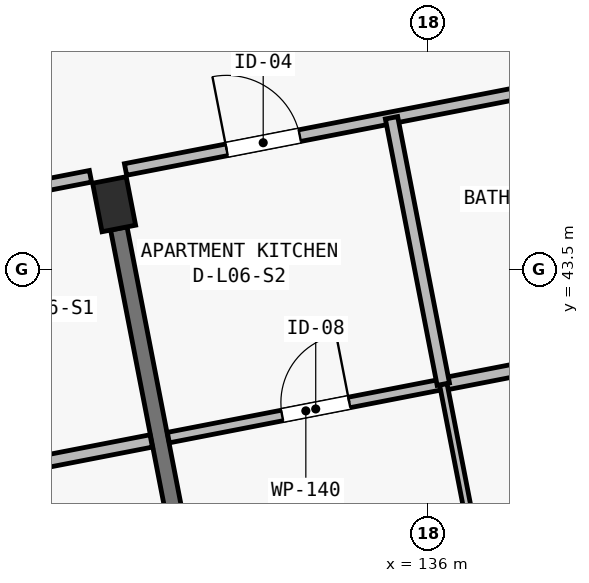
"""IFC4 building model, lengths in metres.
Left out: names, types, materials, properties, quantities, classifications, styles, units other than length and angle.
Written with IfcOpenShell. Run it as: python <this file> out.ifc"""

import sys

from ifc_helpers import new_model, si_unit, direction, frame, frame_2d, origin, origin_2d, place, context, subcontext, project, spatial, rectangle, extrude, element, fill, save


model = new_model("IFC4")
c1 = context("Model", 3, precision=1e-05, world=origin(), true_north=direction((0.0, 1.0)))
c2 = subcontext(c1, "Body", "Model", "MODEL_VIEW")
j1 = project(units=[si_unit("LENGTHUNIT", "METRE"), si_unit("PLANEANGLEUNIT", "RADIAN")], contexts=[c1])
p1 = place(None, origin())
s1 = spatial("IfcSite", under=j1, at=p1, CompositionType="ELEMENT")
p2 = place(p1, origin())
s2 = spatial("IfcBuilding", under=s1, at=p2, CompositionType="ELEMENT")
p3 = place(p2, frame((0.0, 0.0, 21.4)))
s3 = spatial("IfcBuildingStorey", under=s2, at=p3, CompositionType="ELEMENT", Elevation=21.4)
p4 = place(p3, frame((131.871, 44.361, 0.0), z_axis=(0.0, 0.0, 1.0), x_axis=(0.981627183448, 0.190808995377, 0.0)))
e1 = element("IfcColumn", 1, at=p4, inside=s3, PredefinedType="COLUMN", context=c2, shape_type="SweptSolid", body=[
    extrude(rectangle(XDim=0.45, YDim=0.65, at=origin_2d()), origin(), (0.0, 0.0, 1.0), 3.25),
])
p5 = place(p3, frame((133.259, 37.219, 0.0), z_axis=(0.0, 0.0, 1.0), x_axis=(-0.19081042584, 0.981626905393, 0.0)))
e2 = element("IfcWall", 2, at=p5, inside=s3, PredefinedType="SHEAR", context=c2, shape_type="SweptSolid", body=[
    extrude(rectangle(XDim=6.95, YDim=0.22, at=frame_2d((3.475, 0.0))), origin(), (0.0, 0.0, 1.0), 2.5),
])
p6 = place(p3, frame((124.561, 43.368, 0.0), z_axis=(0.0, 0.0, 1.0), x_axis=(0.981630356092, 0.190792672811, 0.0)))
e3 = element("IfcWall", 3, at=p6, inside=s3, PredefinedType="PARTITIONING", context=c2, shape_type="SweptSolid", body=[
    extrude(rectangle(XDim=7.13, YDim=0.155, at=frame_2d((3.565, 0.0))), origin(), (0.0, 0.0, 1.0), 2.97),
])
p7 = place(p6, frame((1.355, 0.0, 0.0)))
e4 = element("IfcOpeningElement", 4, at=p7, cuts=e3, PredefinedType="OPENING", context=c2, shape_type="SweptSolid", body=[
    extrude(rectangle(XDim=1.02, YDim=2.2, at=frame_2d((0.51, 1.1))), frame((0.0, 0.093, 0.0), z_axis=(0.0, -1.0, 0.0), x_axis=(1.0, 0.0, 0.0)), (0.0, 0.0, 1.0), 0.185),
])
p8 = place(p3, frame((128.741, 40.543, 0.0), z_axis=(0.0, 0.0, 1.0), x_axis=(0.981626422232, 0.190812911449, 0.0)))
e5 = element("IfcWall", 5, at=p8, inside=s3, PredefinedType="PLUMBINGWALL", context=c2, shape_type="SweptSolid", body=[
    extrude(rectangle(XDim=3.685, YDim=0.165, at=frame_2d((1.842, 0.0))), origin(), (0.0, 0.0, 1.0), 2.97),
])
p9 = place(p8, frame((1.3, 0.0, 0.0)))
e6 = element("IfcOpeningElement", 6, at=p9, cuts=e5, PredefinedType="OPENING", context=c2, shape_type="SweptSolid", body=[
    extrude(rectangle(XDim=0.82, YDim=2.08, at=frame_2d((0.41, 1.04))), frame((0.0, 0.097, 0.0), z_axis=(0.0, -1.0, 0.0), x_axis=(1.0, 0.0, 0.0)), (0.0, 0.0, 1.0), 0.195),
])
p10 = place(p3, frame((132.021, 44.818, 0.0), z_axis=(0.0, 0.0, 1.0), x_axis=(0.981629109582, 0.190799086008, 0.0)))
e7 = element("IfcWall", 7, at=p10, inside=s3, PredefinedType="PARTITIONING", context=c2, shape_type="SweptSolid", body=[
    extrude(rectangle(XDim=7.13, YDim=0.155, at=frame_2d((3.565, 0.0))), origin(), (0.0, 0.0, 1.0), 2.97),
])
p11 = place(p10, frame((1.355, 0.0, 0.0)))
e8 = element("IfcOpeningElement", 8, at=p11, cuts=e7, PredefinedType="OPENING", context=c2, shape_type="SweptSolid", body=[
    extrude(rectangle(XDim=0.98, YDim=2.15, at=frame_2d((0.49, 1.075))), frame((0.0, 0.093, 0.0), z_axis=(0.0, -1.0, 0.0), x_axis=(1.0, 0.0, 0.0)), (0.0, 0.0, 1.0), 0.185),
])
p12 = place(p3, frame((132.584, 41.291, 0.0), z_axis=(0.0, 0.0, 1.0), x_axis=(0.981628834294, 0.190800502313, 0.0)))
e9 = element("IfcWall", 9, at=p12, inside=s3, PredefinedType="PARTITIONING", context=c2, shape_type="SweptSolid", body=[
    extrude(rectangle(XDim=3.685, YDim=0.14, at=frame_2d((1.843, 0.0))), origin(), (0.0, 0.0, 1.0), 2.97),
])
p13 = place(p12, frame((1.525, 0.0, 0.0)))
e10 = element("IfcOpeningElement", 10, at=p13, cuts=e9, PredefinedType="OPENING", context=c2, shape_type="SweptSolid", body=[
    extrude(rectangle(XDim=0.9, YDim=2.1, at=frame_2d((0.45, 1.05))), frame((0.0, 0.085, 0.0), z_axis=(0.0, -1.0, 0.0), x_axis=(1.0, 0.0, 0.0)), (0.0, 0.0, 1.0), 0.17),
])
p14 = place(p3, frame((136.202, 41.994, 0.0), z_axis=(0.0, 0.0, 1.0), x_axis=(0.981626422232, 0.190812911449, 0.0)))
e11 = element("IfcWall", 11, at=p14, inside=s3, PredefinedType="PLUMBINGWALL", context=c2, shape_type="SweptSolid", body=[
    extrude(rectangle(XDim=3.685, YDim=0.165, at=frame_2d((1.842, 0.0))), origin(), (0.0, 0.0, 1.0), 2.97),
])
p15 = place(p14, frame((1.3, 0.0, 0.0)))
e12 = element("IfcOpeningElement", 12, at=p15, cuts=e11, PredefinedType="OPENING", context=c2, shape_type="SweptSolid", body=[
    extrude(rectangle(XDim=0.82, YDim=2.08, at=frame_2d((0.41, 1.04))), frame((0.0, 0.097, 0.0), z_axis=(0.0, -1.0, 0.0), x_axis=(1.0, 0.0, 0.0)), (0.0, 0.0, 1.0), 0.195),
])
p16 = place(p3, frame((137.125, 37.242, 0.0), z_axis=(0.0, 0.0, 1.0), x_axis=(-0.190768400775, 0.981635073368, 0.0)))
e13 = element("IfcWall", 13, at=p16, inside=s3, PredefinedType="PARTITIONING", context=c2, shape_type="SweptSolid", body=[
    extrude(rectangle(XDim=4.84, YDim=0.1, at=frame_2d((2.42, 0.0))), origin(), (0.0, 0.0, 1.0), 2.97),
])
p17 = place(p16, frame((1.35, 0.0, 0.0)))
e14 = element("IfcOpeningElement", 14, at=p17, cuts=e13, PredefinedType="OPENING", context=c2, shape_type="SweptSolid", body=[
    extrude(rectangle(XDim=0.88, YDim=2.1, at=frame_2d((0.44, 1.05))), frame((0.0, 0.065, 0.0), z_axis=(0.0, -1.0, 0.0), x_axis=(1.0, 0.0, 0.0)), (0.0, 0.0, 1.0), 0.13),
])
p18 = place(p3, frame((136.202, 41.994, 0.0), z_axis=(0.0, 0.0, 1.0), x_axis=(-0.190865998276, 0.981616101489, 0.0)))
e15 = element("IfcWall", 15, at=p18, inside=s3, PredefinedType="PLUMBINGWALL", context=c2, shape_type="SweptSolid", body=[
    extrude(rectangle(XDim=3.57, YDim=0.165, at=frame_2d((1.785, 0.0))), origin(), (0.0, 0.0, 1.0), 2.97),
])
p19 = place(p11, origin())
e16 = element("IfcDoor", 16, at=p19, inside=s3, OperationType="SINGLE_SWING_LEFT", PredefinedType="DOOR", context=c2, shape_type="SweptSolid", body=[
    extrude(rectangle(XDim=0.98, YDim=2.15, at=frame_2d((0.49, 1.075))), frame((0.0, 0.025, 0.0), z_axis=(0.0, -1.0, 0.0), x_axis=(1.0, 0.0, 0.0)), (0.0, 0.0, 1.0), 0.05),
])
fill(e8, e16)
p20 = place(p13, origin())
e17 = element("IfcDoor", 17, at=p20, inside=s3, OperationType="SINGLE_SWING_RIGHT", PredefinedType="DOOR", context=c2, shape_type="SweptSolid", body=[
    extrude(rectangle(XDim=0.9, YDim=2.1, at=frame_2d((0.45, 1.05))), frame((0.0, 0.025, 0.0), z_axis=(0.0, -1.0, 0.0), x_axis=(1.0, 0.0, 0.0)), (0.0, 0.0, 1.0), 0.05),
])
fill(e10, e17)
save(model, sys.argv[1])
